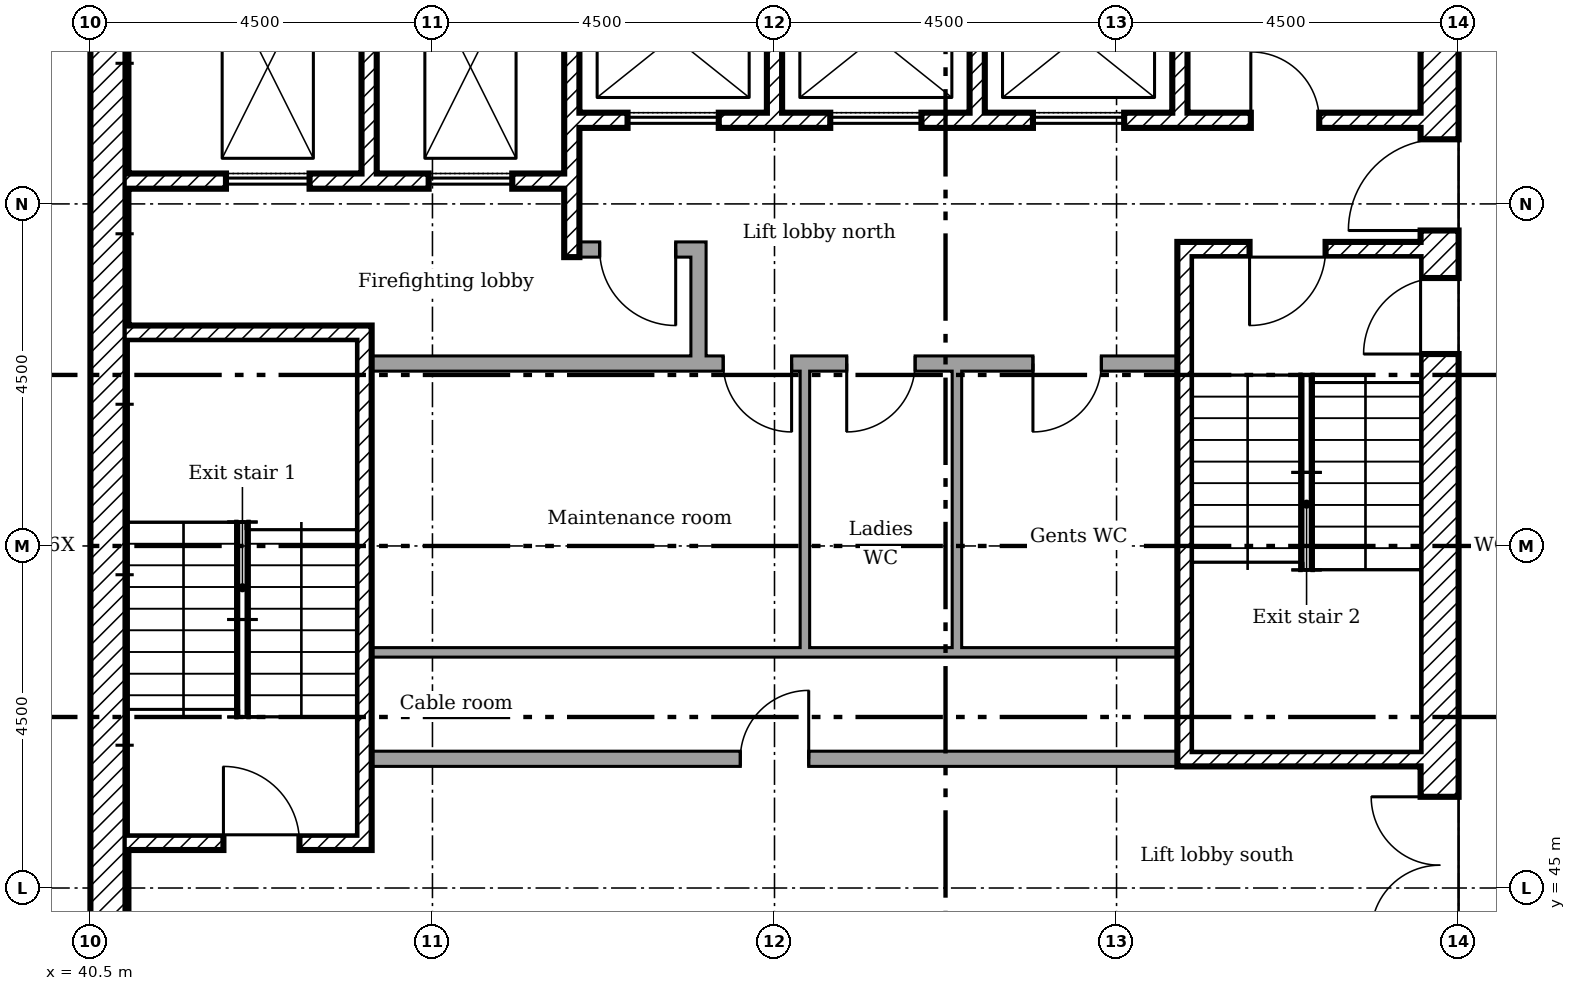
"""IFC4 building model, lengths in metres.
Left out: names, types, materials, properties, quantities, classifications, styles, units other than length and angle.
Written with IfcOpenShell. Run it as: python <this file> out.ifc"""

import sys

from ifc_helpers import new_model, si_unit, direction, frame, frame_2d, origin, place, context, subcontext, project, spatial, rectangle, extrude, element, fill, save


model = new_model("IFC4")
c1 = context("Model", 3, precision=1e-05, world=origin(), true_north=direction((0.0, 1.0)))
c2 = subcontext(c1, "Body", "Model", "MODEL_VIEW")
j1 = project(units=[si_unit("LENGTHUNIT", "METRE"), si_unit("PLANEANGLEUNIT", "RADIAN")], contexts=[c1])
p1 = place(None, origin())
s1 = spatial("IfcSite", under=j1, at=p1, CompositionType="ELEMENT")
p2 = place(p1, origin())
s2 = spatial("IfcBuilding", under=s1, at=p2, CompositionType="ELEMENT")
p3 = place(p2, frame((0.0, 0.0, 246.0)))
s3 = spatial("IfcBuildingStorey", under=s2, at=p3, CompositionType="ELEMENT", Elevation=246.0)
p4 = place(p3, frame((58.25, 40.5, 0.0), z_axis=(0.0, 0.0, 1.0), x_axis=(0.0, 1.0, 0.0)))
e1 = element("IfcWall", 1, at=p4, inside=s3, PredefinedType="SHEAR", context=c2, shape_type="SweptSolid", body=[
    extrude(rectangle(XDim=18.0, YDim=0.5, at=frame_2d((9.0, 0.0))), origin(), (0.0, 0.0, 1.0), 4.75),
])
p5 = place(p4, frame((13.15, 0.0, 0.0)))
e2 = element("IfcOpeningElement", 2, at=p5, cuts=e1, PredefinedType="OPENING", context=c2, shape_type="SweptSolid", body=[
    extrude(rectangle(XDim=1.2, YDim=2.1, at=frame_2d((0.6, 1.05))), frame((0.0, 0.26, 0.0), z_axis=(0.0, -1.0, 0.0), x_axis=(1.0, 0.0, 0.0)), (0.0, 0.0, 1.0), 0.52),
])
p6 = place(p4, frame((3.9, 0.0, 0.0)))
e3 = element("IfcOpeningElement", 3, at=p6, cuts=e1, PredefinedType="OPENING", context=c2, shape_type="SweptSolid", body=[
    extrude(rectangle(XDim=1.8, YDim=2.1, at=frame_2d((0.9, 1.05))), frame((0.0, 0.26, 0.0), z_axis=(0.0, -1.0, 0.0), x_axis=(1.0, 0.0, 0.0)), (0.0, 0.0, 1.0), 0.52),
])
p7 = place(p4, frame((11.525, 0.0, 0.0)))
e4 = element("IfcOpeningElement", 4, at=p7, cuts=e1, PredefinedType="OPENING", context=c2, shape_type="SweptSolid", body=[
    extrude(rectangle(XDim=1.0, YDim=2.1, at=frame_2d((0.5, 1.05))), frame((0.0, 0.26, 0.0), z_axis=(0.0, -1.0, 0.0), x_axis=(1.0, 0.0, 0.0)), (0.0, 0.0, 1.0), 0.52),
])
p8 = place(p3, frame((40.75, 41.0, 0.0), z_axis=(0.0, 0.0, 1.0), x_axis=(0.0, 1.0, 0.0)))
e5 = element("IfcWall", 5, at=p8, inside=s3, PredefinedType="SHEAR", context=c2, shape_type="SweptSolid", body=[
    extrude(rectangle(XDim=17.0, YDim=0.5, at=frame_2d((8.5, 0.0))), origin(), (0.0, 0.0, 1.0), 4.75),
])
p9 = place(p3, frame((44.167, 58.0, 0.0), z_axis=(0.0, 0.0, 1.0), x_axis=(0.0, -1.0, 0.0)))
e6 = element("IfcWall", 6, at=p9, inside=s3, PredefinedType="SHEAR", context=c2, shape_type="SweptSolid", body=[
    extrude(rectangle(XDim=3.6, YDim=0.2, at=frame_2d((1.8, 0.0))), origin(), (0.0, 0.0, 1.0), 4.75),
])
p10 = place(p3, frame((46.833, 58.0, 0.0), z_axis=(0.0, 0.0, 1.0), x_axis=(0.0, -1.0, 0.0)))
e7 = element("IfcWall", 7, at=p10, inside=s3, PredefinedType="SHEAR", context=c2, shape_type="SweptSolid", body=[
    extrude(rectangle(XDim=4.7, YDim=0.2, at=frame_2d((2.35, 0.0))), origin(), (0.0, 0.0, 1.0), 4.75),
])
for number, where, z_axis, x_axis in (
    (8, (49.5, 58.0, 0.0), (0.0, 0.0, 1.0), (0.0, -1.0, 0.0)),
    (9, (52.167, 58.0, 0.0), (0.0, 0.0, 1.0), (0.0, -1.0, 0.0)),
    (10, (54.833, 58.0, 0.0), (0.0, 0.0, 1.0), (0.0, -1.0, 0.0)),
):
    element("IfcWall", number, at=place(p3, frame(where, z_axis=z_axis, x_axis=x_axis)), inside=s3, PredefinedType="SHEAR", context=c2, shape_type="SweptSolid", body=[
        extrude(rectangle(XDim=2.8, YDim=0.2, at=frame_2d((1.4, 0.0))), origin(), (0.0, 0.0, 1.0), 4.75),
    ])
p11 = place(p3, frame((48.5, 51.9, 0.0), z_axis=(0.0, 0.0, 1.0), x_axis=(0.0, 1.0, 0.0)))
e11 = element("IfcWall", 11, at=p11, inside=s3, PredefinedType="PARTITIONING", context=c2, shape_type="SweptSolid", body=[
    extrude(rectangle(XDim=1.6, YDim=0.2, at=frame_2d((0.8, 0.0))), origin(), (0.0, 0.0, 1.0), 4.75),
])
p12 = place(p3, frame((46.933, 53.4, 0.0)))
e12 = element("IfcWall", 12, at=p12, inside=s3, PredefinedType="PARTITIONING", context=c2, shape_type="SweptSolid", body=[
    extrude(rectangle(XDim=1.467, YDim=0.2, at=frame_2d((0.733, 0.0))), origin(), (0.0, 0.0, 1.0), 4.75),
])
p13 = place(p12, frame((0.267, 0.0, 0.0)))
e13 = element("IfcOpeningElement", 13, at=p13, cuts=e12, PredefinedType="OPENING", context=c2, shape_type="SweptSolid", body=[
    extrude(rectangle(XDim=1.0, YDim=2.1, at=frame_2d((0.5, 1.05))), frame((0.0, 0.11, 0.0), z_axis=(0.0, -1.0, 0.0), x_axis=(1.0, 0.0, 0.0)), (0.0, 0.0, 1.0), 0.22),
])
p14 = place(p3, frame((46.933, 55.1, 0.0)))
e14 = element("IfcWall", 14, at=p14, inside=s3, PredefinedType="SHEAR", context=c2, shape_type="SweptSolid", body=[
    extrude(rectangle(XDim=11.067, YDim=0.2, at=frame_2d((5.533, 0.0))), origin(), (0.0, 0.0, 1.0), 4.75),
])
p15 = place(p14, frame((8.833, 0.0, 0.0)))
e15 = element("IfcOpeningElement", 15, at=p15, cuts=e14, PredefinedType="OPENING", context=c2, shape_type="SweptSolid", body=[
    extrude(rectangle(XDim=0.9, YDim=2.1, at=frame_2d((0.45, 1.05))), frame((0.0, 0.11, 0.0), z_axis=(0.0, -1.0, 0.0), x_axis=(1.0, 0.0, 0.0)), (0.0, 0.0, 1.0), 0.22),
])
p16 = place(p14, frame((0.633, 0.0, 0.0)))
e16 = element("IfcOpeningElement", 16, at=p16, cuts=e14, PredefinedType="OPENING", context=c2, shape_type="SweptSolid", body=[
    extrude(rectangle(XDim=1.2, YDim=2.1, at=frame_2d((0.6, 1.05))), frame((0.0, 0.11, 0.0), z_axis=(0.0, -1.0, 0.0), x_axis=(1.0, 0.0, 0.0)), (0.0, 0.0, 1.0), 0.22),
])
p17 = place(p14, frame((3.3, 0.0, 0.0)))
e17 = element("IfcOpeningElement", 17, at=p17, cuts=e14, PredefinedType="OPENING", context=c2, shape_type="SweptSolid", body=[
    extrude(rectangle(XDim=1.2, YDim=2.1, at=frame_2d((0.6, 1.05))), frame((0.0, 0.11, 0.0), z_axis=(0.0, -1.0, 0.0), x_axis=(1.0, 0.0, 0.0)), (0.0, 0.0, 1.0), 0.22),
])
p18 = place(p14, frame((5.967, 0.0, 0.0)))
e18 = element("IfcOpeningElement", 18, at=p18, cuts=e14, PredefinedType="OPENING", context=c2, shape_type="SweptSolid", body=[
    extrude(rectangle(XDim=1.2, YDim=2.1, at=frame_2d((0.6, 1.05))), frame((0.0, 0.11, 0.0), z_axis=(0.0, -1.0, 0.0), x_axis=(1.0, 0.0, 0.0)), (0.0, 0.0, 1.0), 0.22),
])
p19 = place(p3, frame((41.0, 54.3, 0.0)))
e19 = element("IfcWall", 19, at=p19, inside=s3, PredefinedType="SHEAR", context=c2, shape_type="SweptSolid", body=[
    extrude(rectangle(XDim=5.733, YDim=0.2, at=frame_2d((2.867, 0.0))), origin(), (0.0, 0.0, 1.0), 4.75),
])
p20 = place(p19, frame((1.283, 0.0, 0.0)))
e20 = element("IfcOpeningElement", 20, at=p20, cuts=e19, PredefinedType="OPENING", context=c2, shape_type="SweptSolid", body=[
    extrude(rectangle(XDim=1.1, YDim=2.1, at=frame_2d((0.55, 1.05))), frame((0.0, 0.11, 0.0), z_axis=(0.0, -1.0, 0.0), x_axis=(1.0, 0.0, 0.0)), (0.0, 0.0, 1.0), 0.22),
])
p21 = place(p19, frame((3.95, 0.0, 0.0)))
e21 = element("IfcOpeningElement", 21, at=p21, cuts=e19, PredefinedType="OPENING", context=c2, shape_type="SweptSolid", body=[
    extrude(rectangle(XDim=1.1, YDim=2.1, at=frame_2d((0.55, 1.05))), frame((0.0, 0.11, 0.0), z_axis=(0.0, -1.0, 0.0), x_axis=(1.0, 0.0, 0.0)), (0.0, 0.0, 1.0), 0.22),
])
p22 = place(p3, frame((44.1, 45.5, 0.0), z_axis=(0.0, 0.0, 1.0), x_axis=(0.0, 1.0, 0.0)))
e22 = element("IfcWall", 22, at=p22, inside=s3, PredefinedType="SHEAR", context=c2, shape_type="SweptSolid", body=[
    extrude(rectangle(XDim=6.9, YDim=0.2, at=frame_2d((3.45, 0.0))), origin(), (0.0, 0.0, 1.0), 4.75),
])
p23 = place(p3, frame((41.0, 52.3, 0.0)))
e23 = element("IfcWall", 23, at=p23, inside=s3, PredefinedType="SHEAR", context=c2, shape_type="SweptSolid", body=[
    extrude(rectangle(XDim=3.0, YDim=0.2, at=frame_2d((1.5, 0.0))), origin(), (0.0, 0.0, 1.0), 4.75),
])
p24 = place(p3, frame((41.0, 45.6, 0.0)))
e24 = element("IfcWall", 24, at=p24, inside=s3, PredefinedType="SHEAR", context=c2, shape_type="SweptSolid", body=[
    extrude(rectangle(XDim=3.0, YDim=0.2, at=frame_2d((1.5, 0.0))), origin(), (0.0, 0.0, 1.0), 4.75),
])
p25 = place(p24, frame((1.25, 0.0, 0.0)))
e25 = element("IfcOpeningElement", 25, at=p25, cuts=e24, PredefinedType="OPENING", context=c2, shape_type="SweptSolid", body=[
    extrude(rectangle(XDim=1.0, YDim=2.1, at=frame_2d((0.5, 1.05))), frame((0.0, 0.11, 0.0), z_axis=(0.0, -1.0, 0.0), x_axis=(1.0, 0.0, 0.0)), (0.0, 0.0, 1.0), 0.22),
])
p26 = place(p3, frame((54.8, 53.4, 0.0)))
e26 = element("IfcWall", 26, at=p26, inside=s3, PredefinedType="SHEAR", context=c2, shape_type="SweptSolid", body=[
    extrude(rectangle(XDim=3.2, YDim=0.2, at=frame_2d((1.6, 0.0))), origin(), (0.0, 0.0, 1.0), 4.75),
])
p27 = place(p26, frame((0.95, 0.0, 0.0)))
e27 = element("IfcOpeningElement", 27, at=p27, cuts=e26, PredefinedType="OPENING", context=c2, shape_type="SweptSolid", body=[
    extrude(rectangle(XDim=1.0, YDim=2.1, at=frame_2d((0.5, 1.05))), frame((0.0, 0.11, 0.0), z_axis=(0.0, -1.0, 0.0), x_axis=(1.0, 0.0, 0.0)), (0.0, 0.0, 1.0), 0.22),
])
p28 = place(p3, frame((54.8, 46.7, 0.0)))
e28 = element("IfcWall", 28, at=p28, inside=s3, PredefinedType="SHEAR", context=c2, shape_type="SweptSolid", body=[
    extrude(rectangle(XDim=3.2, YDim=0.2, at=frame_2d((1.6, 0.0))), origin(), (0.0, 0.0, 1.0), 4.75),
])
p29 = place(p3, frame((54.9, 46.8, 0.0), z_axis=(0.0, 0.0, 1.0), x_axis=(0.0, 1.0, 0.0)))
e29 = element("IfcWall", 29, at=p29, inside=s3, PredefinedType="SHEAR", context=c2, shape_type="SweptSolid", body=[
    extrude(rectangle(XDim=6.5, YDim=0.2, at=frame_2d((3.25, 0.0))), origin(), (0.0, 0.0, 1.0), 4.75),
])
p30 = place(p3, frame((44.2, 51.9, 0.0)))
e30 = element("IfcWall", 30, at=p30, inside=s3, PredefinedType="PARTITIONING", context=c2, shape_type="SweptSolid", body=[
    extrude(rectangle(XDim=10.6, YDim=0.2, at=frame_2d((5.3, 0.0))), origin(), (0.0, 0.0, 1.0), 4.75),
])
p31 = place(p30, frame((4.625, 0.0, 0.0)))
e31 = element("IfcOpeningElement", 31, at=p31, cuts=e30, PredefinedType="OPENING", context=c2, shape_type="SweptSolid", body=[
    extrude(rectangle(XDim=0.9, YDim=2.1, at=frame_2d((0.45, 1.05))), frame((0.0, 0.11, 0.0), z_axis=(0.0, -1.0, 0.0), x_axis=(1.0, 0.0, 0.0)), (0.0, 0.0, 1.0), 0.22),
])
p32 = place(p30, frame((6.25, 0.0, 0.0)))
e32 = element("IfcOpeningElement", 32, at=p32, cuts=e30, PredefinedType="OPENING", context=c2, shape_type="SweptSolid", body=[
    extrude(rectangle(XDim=0.9, YDim=2.1, at=frame_2d((0.45, 1.05))), frame((0.0, 0.11, 0.0), z_axis=(0.0, -1.0, 0.0), x_axis=(1.0, 0.0, 0.0)), (0.0, 0.0, 1.0), 0.22),
])
p33 = place(p30, frame((8.7, 0.0, 0.0)))
e33 = element("IfcOpeningElement", 33, at=p33, cuts=e30, PredefinedType="OPENING", context=c2, shape_type="SweptSolid", body=[
    extrude(rectangle(XDim=0.9, YDim=2.1, at=frame_2d((0.45, 1.05))), frame((0.0, 0.11, 0.0), z_axis=(0.0, -1.0, 0.0), x_axis=(1.0, 0.0, 0.0)), (0.0, 0.0, 1.0), 0.22),
])
p34 = place(p3, frame((44.2, 46.7, 0.0)))
e34 = element("IfcWall", 34, at=p34, inside=s3, PredefinedType="PARTITIONING", context=c2, shape_type="SweptSolid", body=[
    extrude(rectangle(XDim=10.6, YDim=0.2, at=frame_2d((5.3, 0.0))), origin(), (0.0, 0.0, 1.0), 4.75),
])
p35 = place(p34, frame((4.85, 0.0, 0.0)))
e35 = element("IfcOpeningElement", 35, at=p35, cuts=e34, PredefinedType="OPENING", context=c2, shape_type="SweptSolid", body=[
    extrude(rectangle(XDim=0.9, YDim=2.1, at=frame_2d((0.45, 1.05))), frame((0.0, 0.11, 0.0), z_axis=(0.0, -1.0, 0.0), x_axis=(1.0, 0.0, 0.0)), (0.0, 0.0, 1.0), 0.22),
])
p36 = place(p3, frame((49.962, 48.1, 0.0), z_axis=(0.0, 0.0, 1.0), x_axis=(-1.0, 0.0, 0.0)))
e36 = element("IfcWall", 36, at=p36, inside=s3, PredefinedType="PARTITIONING", context=c2, shape_type="SweptSolid", body=[
    extrude(rectangle(XDim=5.762, YDim=0.125, at=frame_2d((2.881, 0.0))), origin(), (0.0, 0.0, 1.0), 4.75),
])
p37 = place(p3, frame((51.962, 48.1, 0.0), z_axis=(0.0, 0.0, 1.0), x_axis=(-1.0, 0.0, 0.0)))
e37 = element("IfcWall", 37, at=p37, inside=s3, PredefinedType="PARTITIONING", context=c2, shape_type="SweptSolid", body=[
    extrude(rectangle(XDim=2.062, YDim=0.125, at=frame_2d((1.031, 0.0))), origin(), (0.0, 0.0, 1.0), 4.75),
])
p38 = place(p3, frame((49.9, 48.163, 0.0), z_axis=(0.0, 0.0, 1.0), x_axis=(0.0, 1.0, 0.0)))
e38 = element("IfcWall", 38, at=p38, inside=s3, PredefinedType="PARTITIONING", context=c2, shape_type="SweptSolid", body=[
    extrude(rectangle(XDim=3.637, YDim=0.125, at=frame_2d((1.819, 0.0))), origin(), (0.0, 0.0, 1.0), 4.75),
])
p39 = place(p3, frame((54.8, 48.1, 0.0), z_axis=(0.0, 0.0, 1.0), x_axis=(-1.0, 0.0, 0.0)))
e39 = element("IfcWall", 39, at=p39, inside=s3, PredefinedType="PARTITIONING", context=c2, shape_type="SweptSolid", body=[
    extrude(rectangle(XDim=2.9, YDim=0.125, at=frame_2d((1.45, 0.0))), origin(), (0.0, 0.0, 1.0), 4.75),
])
p40 = place(p3, frame((51.9, 48.163, 0.0), z_axis=(0.0, 0.0, 1.0), x_axis=(0.0, 1.0, 0.0)))
e40 = element("IfcWall", 40, at=p40, inside=s3, PredefinedType="PARTITIONING", context=c2, shape_type="SweptSolid", body=[
    extrude(rectangle(XDim=3.637, YDim=0.125, at=frame_2d((1.819, 0.0))), origin(), (0.0, 0.0, 1.0), 4.75),
])
p41 = place(p5, origin())
e41 = element("IfcDoor", 41, at=p41, inside=s3, OperationType="SINGLE_SWING_RIGHT", PredefinedType="DOOR", context=c2, shape_type="SweptSolid", body=[
    extrude(rectangle(XDim=1.2, YDim=2.1, at=frame_2d((0.6, 1.05))), frame((0.0, 0.025, 0.0), z_axis=(0.0, -1.0, 0.0), x_axis=(1.0, 0.0, 0.0)), (0.0, 0.0, 1.0), 0.05),
])
fill(e2, e41)
p42 = place(p6, origin())
e42 = element("IfcDoor", 42, at=p42, inside=s3, OperationType="DOUBLE_DOOR_SINGLE_SWING", PredefinedType="DOOR", context=c2, shape_type="SweptSolid", body=[
    extrude(rectangle(XDim=1.8, YDim=2.1, at=frame_2d((0.9, 1.05))), frame((0.0, 0.025, 0.0), z_axis=(0.0, -1.0, 0.0), x_axis=(1.0, 0.0, 0.0)), (0.0, 0.0, 1.0), 0.05),
])
fill(e3, e42)
p43 = place(p25, origin())
e43 = element("IfcDoor", 43, at=p43, inside=s3, OperationType="SINGLE_SWING_RIGHT", PredefinedType="DOOR", context=c2, shape_type="SweptSolid", body=[
    extrude(rectangle(XDim=1.0, YDim=2.1, at=frame_2d((0.5, 1.05))), frame((0.0, 0.025, 0.0), z_axis=(0.0, -1.0, 0.0), x_axis=(1.0, 0.0, 0.0)), (0.0, 0.0, 1.0), 0.05),
])
fill(e25, e43)
p44 = place(p27, frame((1.0, 0.0, 0.0), x_axis=(-1.0, 0.0, 0.0)))
e44 = element("IfcDoor", 44, at=p44, inside=s3, OperationType="SINGLE_SWING_LEFT", PredefinedType="DOOR", context=c2, shape_type="SweptSolid", body=[
    extrude(rectangle(XDim=1.0, YDim=2.1, at=frame_2d((0.5, 1.05))), frame((0.0, 0.025, 0.0), z_axis=(0.0, -1.0, 0.0), x_axis=(1.0, 0.0, 0.0)), (0.0, 0.0, 1.0), 0.05),
])
fill(e27, e44)
p45 = place(p7, origin())
e45 = element("IfcDoor", 45, at=p45, inside=s3, OperationType="SINGLE_SWING_RIGHT", PredefinedType="DOOR", context=c2, shape_type="SweptSolid", body=[
    extrude(rectangle(XDim=1.0, YDim=2.1, at=frame_2d((0.5, 1.05))), frame((0.0, 0.025, 0.0), z_axis=(0.0, -1.0, 0.0), x_axis=(1.0, 0.0, 0.0)), (0.0, 0.0, 1.0), 0.05),
])
fill(e4, e45)
p46 = place(p13, frame((1.0, 0.0, 0.0), x_axis=(-1.0, 0.0, 0.0)))
e46 = element("IfcDoor", 46, at=p46, inside=s3, OperationType="SINGLE_SWING_RIGHT", PredefinedType="DOOR", context=c2, shape_type="SweptSolid", body=[
    extrude(rectangle(XDim=1.0, YDim=2.1, at=frame_2d((0.5, 1.05))), frame((0.0, 0.025, 0.0), z_axis=(0.0, -1.0, 0.0), x_axis=(1.0, 0.0, 0.0)), (0.0, 0.0, 1.0), 0.05),
])
fill(e13, e46)
p47 = place(p15, origin())
e47 = element("IfcDoor", 47, at=p47, inside=s3, OperationType="SINGLE_SWING_RIGHT", PredefinedType="DOOR", context=c2, shape_type="SweptSolid", body=[
    extrude(rectangle(XDim=0.9, YDim=2.1, at=frame_2d((0.45, 1.05))), frame((0.0, 0.025, 0.0), z_axis=(0.0, -1.0, 0.0), x_axis=(1.0, 0.0, 0.0)), (0.0, 0.0, 1.0), 0.05),
])
fill(e15, e47)
p48 = place(p35, origin())
e48 = element("IfcDoor", 48, at=p48, inside=s3, OperationType="SINGLE_SWING_LEFT", PredefinedType="DOOR", context=c2, shape_type="SweptSolid", body=[
    extrude(rectangle(XDim=0.9, YDim=2.1, at=frame_2d((0.45, 1.05))), frame((0.0, 0.025, 0.0), z_axis=(0.0, -1.0, 0.0), x_axis=(1.0, 0.0, 0.0)), (0.0, 0.0, 1.0), 0.05),
])
fill(e35, e48)
p49 = place(p31, frame((0.9, 0.0, 0.0), x_axis=(-1.0, 0.0, 0.0)))
e49 = element("IfcDoor", 49, at=p49, inside=s3, OperationType="SINGLE_SWING_RIGHT", PredefinedType="DOOR", context=c2, shape_type="SweptSolid", body=[
    extrude(rectangle(XDim=0.9, YDim=2.1, at=frame_2d((0.45, 1.05))), frame((0.0, 0.025, 0.0), z_axis=(0.0, -1.0, 0.0), x_axis=(1.0, 0.0, 0.0)), (0.0, 0.0, 1.0), 0.05),
])
fill(e31, e49)
p50 = place(p32, frame((0.9, 0.0, 0.0), x_axis=(-1.0, 0.0, 0.0)))
e50 = element("IfcDoor", 50, at=p50, inside=s3, OperationType="SINGLE_SWING_LEFT", PredefinedType="DOOR", context=c2, shape_type="SweptSolid", body=[
    extrude(rectangle(XDim=0.9, YDim=2.1, at=frame_2d((0.45, 1.05))), frame((0.0, 0.025, 0.0), z_axis=(0.0, -1.0, 0.0), x_axis=(1.0, 0.0, 0.0)), (0.0, 0.0, 1.0), 0.05),
])
fill(e32, e50)
p51 = place(p33, frame((0.9, 0.0, 0.0), x_axis=(-1.0, 0.0, 0.0)))
e51 = element("IfcDoor", 51, at=p51, inside=s3, OperationType="SINGLE_SWING_LEFT", PredefinedType="DOOR", context=c2, shape_type="SweptSolid", body=[
    extrude(rectangle(XDim=0.9, YDim=2.1, at=frame_2d((0.45, 1.05))), frame((0.0, 0.025, 0.0), z_axis=(0.0, -1.0, 0.0), x_axis=(1.0, 0.0, 0.0)), (0.0, 0.0, 1.0), 0.05),
])
fill(e33, e51)
p52 = place(p20, origin())
e52 = element("IfcDoor", 52, at=p52, inside=s3, OperationType="SLIDING_TO_LEFT", PredefinedType="DOOR", context=c2, shape_type="SweptSolid", body=[
    extrude(rectangle(XDim=1.1, YDim=2.1, at=frame_2d((0.55, 1.05))), frame((0.0, 0.025, 0.0), z_axis=(0.0, -1.0, 0.0), x_axis=(1.0, 0.0, 0.0)), (0.0, 0.0, 1.0), 0.05),
])
fill(e20, e52)
p53 = place(p21, origin())
e53 = element("IfcDoor", 53, at=p53, inside=s3, OperationType="SLIDING_TO_LEFT", PredefinedType="DOOR", context=c2, shape_type="SweptSolid", body=[
    extrude(rectangle(XDim=1.1, YDim=2.1, at=frame_2d((0.55, 1.05))), frame((0.0, 0.025, 0.0), z_axis=(0.0, -1.0, 0.0), x_axis=(1.0, 0.0, 0.0)), (0.0, 0.0, 1.0), 0.05),
])
fill(e21, e53)
p54 = place(p16, origin())
e54 = element("IfcDoor", 54, at=p54, inside=s3, OperationType="SLIDING_TO_LEFT", PredefinedType="DOOR", context=c2, shape_type="SweptSolid", body=[
    extrude(rectangle(XDim=1.2, YDim=2.1, at=frame_2d((0.6, 1.05))), frame((0.0, 0.025, 0.0), z_axis=(0.0, -1.0, 0.0), x_axis=(1.0, 0.0, 0.0)), (0.0, 0.0, 1.0), 0.05),
])
fill(e16, e54)
p55 = place(p17, origin())
e55 = element("IfcDoor", 55, at=p55, inside=s3, OperationType="SLIDING_TO_LEFT", PredefinedType="DOOR", context=c2, shape_type="SweptSolid", body=[
    extrude(rectangle(XDim=1.2, YDim=2.1, at=frame_2d((0.6, 1.05))), frame((0.0, 0.025, 0.0), z_axis=(0.0, -1.0, 0.0), x_axis=(1.0, 0.0, 0.0)), (0.0, 0.0, 1.0), 0.05),
])
fill(e17, e55)
p56 = place(p18, origin())
e56 = element("IfcDoor", 56, at=p56, inside=s3, OperationType="SLIDING_TO_LEFT", PredefinedType="DOOR", context=c2, shape_type="SweptSolid", body=[
    extrude(rectangle(XDim=1.2, YDim=2.1, at=frame_2d((0.6, 1.05))), frame((0.0, 0.025, 0.0), z_axis=(0.0, -1.0, 0.0), x_axis=(1.0, 0.0, 0.0)), (0.0, 0.0, 1.0), 0.05),
])
fill(e18, e56)
save(model, sys.argv[1])
